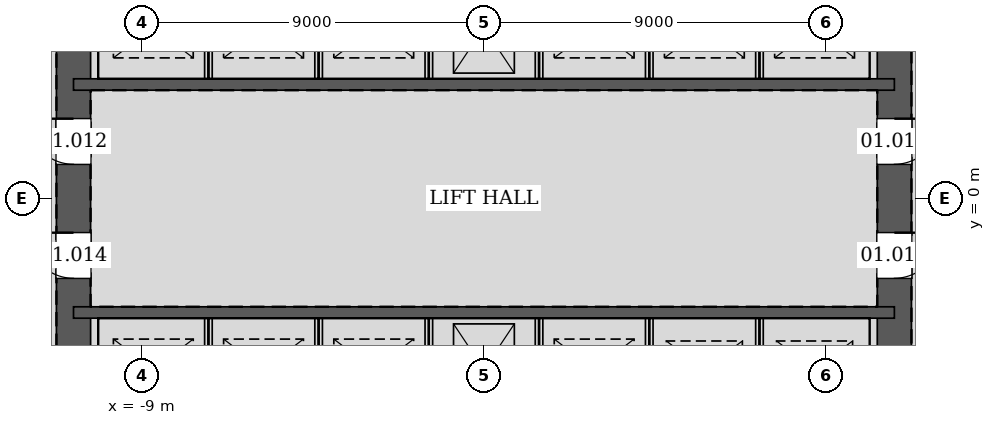
"""IFC4 building model, lengths in metres.
Left out: names, types, materials, properties, quantities, classifications, styles, units other than length and angle.
Written with IfcOpenShell. Run it as: python <this file> out.ifc"""

import sys

from ifc_helpers import new_model, si_unit, direction, frame, frame_2d, origin, place, context, subcontext, project, spatial, rectangle, extrude, element, fill, save


model = new_model("IFC4")
c1 = context("Model", 3, precision=1e-05, world=origin(), true_north=direction((0.0, 1.0)))
c2 = subcontext(c1, "Body", "Model", "MODEL_VIEW")
j1 = project(units=[si_unit("LENGTHUNIT", "METRE"), si_unit("PLANEANGLEUNIT", "RADIAN")], contexts=[c1])
p1 = place(None, origin())
s1 = spatial("IfcSite", under=j1, at=p1, CompositionType="ELEMENT")
p2 = place(p1, origin())
s2 = spatial("IfcBuilding", under=s1, at=p2, CompositionType="ELEMENT")
p3 = place(p2, frame((0.0, 0.0, 7.2)))
s3 = spatial("IfcBuildingStorey", under=s2, at=p3, CompositionType="ELEMENT", Elevation=7.2)
p4 = place(p3, frame((10.8, -10.8, 0.0), z_axis=(0.0, 0.0, 1.0), x_axis=(0.0, 1.0, 0.0)))
e1 = element("IfcWall", 1, at=p4, inside=s3, PredefinedType="SOLIDWALL", context=c2, shape_type="SweptSolid", body=[
    extrude(rectangle(XDim=21.6, YDim=0.9, at=frame_2d((10.8, 0.0))), origin(), (0.0, 0.0, 1.0), 6.0),
])
p5 = place(p4, frame((11.7, 0.0, 0.0)))
e2 = element("IfcOpeningElement", 2, at=p5, cuts=e1, PredefinedType="OPENING", context=c2, shape_type="SweptSolid", body=[
    extrude(rectangle(XDim=1.2, YDim=2.1, at=frame_2d((0.6, 1.05))), frame((0.0, 0.46, 0.0), z_axis=(0.0, -1.0, 0.0), x_axis=(1.0, 0.0, 0.0)), (0.0, 0.0, 1.0), 0.92),
])
p6 = place(p4, frame((8.7, 0.0, 0.0)))
e3 = element("IfcOpeningElement", 3, at=p6, cuts=e1, PredefinedType="OPENING", context=c2, shape_type="SweptSolid", body=[
    extrude(rectangle(XDim=1.2, YDim=2.1, at=frame_2d((0.6, 1.05))), frame((0.0, 0.46, 0.0), z_axis=(0.0, -1.0, 0.0), x_axis=(1.0, 0.0, 0.0)), (0.0, 0.0, 1.0), 0.92),
])
p7 = place(p3, frame((-10.8, 10.8, 0.0), z_axis=(0.0, 0.0, 1.0), x_axis=(0.0, -1.0, 0.0)))
e4 = element("IfcWall", 4, at=p7, inside=s3, PredefinedType="SOLIDWALL", context=c2, shape_type="SweptSolid", body=[
    extrude(rectangle(XDim=21.6, YDim=0.9, at=frame_2d((10.8, 0.0))), origin(), (0.0, 0.0, 1.0), 6.0),
])
p8 = place(p7, frame((8.7, 0.0, 0.0)))
e5 = element("IfcOpeningElement", 5, at=p8, cuts=e4, PredefinedType="OPENING", context=c2, shape_type="SweptSolid", body=[
    extrude(rectangle(XDim=1.2, YDim=2.1, at=frame_2d((0.6, 1.05))), frame((0.0, 0.46, 0.0), z_axis=(0.0, -1.0, 0.0), x_axis=(1.0, 0.0, 0.0)), (0.0, 0.0, 1.0), 0.92),
])
p9 = place(p7, frame((11.7, 0.0, 0.0)))
e6 = element("IfcOpeningElement", 6, at=p9, cuts=e4, PredefinedType="OPENING", context=c2, shape_type="SweptSolid", body=[
    extrude(rectangle(XDim=1.2, YDim=2.1, at=frame_2d((0.6, 1.05))), frame((0.0, 0.46, 0.0), z_axis=(0.0, -1.0, 0.0), x_axis=(1.0, 0.0, 0.0)), (0.0, 0.0, 1.0), 0.92),
])
for number, where, z_axis, x_axis in (
    (7, (-10.8, 3.0, 0.0), (0.0, 0.0, 1.0), (1.0, 0.0, 0.0)),
    (8, (-10.8, -3.0, 0.0), (0.0, 0.0, 1.0), (1.0, 0.0, 0.0)),
):
    element("IfcWall", number, at=place(p3, frame(where, z_axis=z_axis, x_axis=x_axis)), inside=s3, PredefinedType="SOLIDWALL", context=c2, shape_type="SweptSolid", body=[
        extrude(rectangle(XDim=21.6, YDim=0.3, at=frame_2d((10.8, 0.0))), origin(), (0.0, 0.0, 1.0), 6.0),
    ])
for number, where, z_axis, x_axis in (
    (9, (-7.25, 3.15, 0.0), (0.0, 0.0, 1.0), (0.0, 1.0, 0.0)),
    (10, (-4.35, 3.15, 0.0), (0.0, 0.0, 1.0), (0.0, 1.0, 0.0)),
    (11, (-1.45, 3.15, 0.0), (0.0, 0.0, 1.0), (0.0, 1.0, 0.0)),
    (12, (1.45, 3.15, 0.0), (0.0, 0.0, 1.0), (0.0, 1.0, 0.0)),
    (13, (4.35, 3.15, 0.0), (0.0, 0.0, 1.0), (0.0, 1.0, 0.0)),
    (14, (7.25, 3.15, 0.0), (0.0, 0.0, 1.0), (0.0, 1.0, 0.0)),
    (15, (-7.25, -5.85, 0.0), (0.0, 0.0, 1.0), (0.0, 1.0, 0.0)),
    (16, (-4.35, -5.85, 0.0), (0.0, 0.0, 1.0), (0.0, 1.0, 0.0)),
    (17, (-1.45, -5.85, 0.0), (0.0, 0.0, 1.0), (0.0, 1.0, 0.0)),
    (18, (1.45, -5.85, 0.0), (0.0, 0.0, 1.0), (0.0, 1.0, 0.0)),
    (19, (4.35, -5.85, 0.0), (0.0, 0.0, 1.0), (0.0, 1.0, 0.0)),
    (20, (7.25, -5.85, 0.0), (0.0, 0.0, 1.0), (0.0, 1.0, 0.0)),
):
    element("IfcWall", number, at=place(p3, frame(where, z_axis=z_axis, x_axis=x_axis)), inside=s3, PredefinedType="PARTITIONING", context=c2, shape_type="SweptSolid", body=[
        extrude(rectangle(XDim=2.7, YDim=0.2, at=frame_2d((1.35, 0.0))), origin(), (0.0, 0.0, 1.0), 6.0),
    ])
p10 = place(p5, frame((1.2, 0.0, 0.0), z_axis=(0.0, 0.0, 1.0), x_axis=(-1.0, 0.0, 0.0)))
e21 = element("IfcDoor", 21, at=p10, inside=s3, OperationType="SINGLE_SWING_LEFT", PredefinedType="DOOR", context=c2, shape_type="SweptSolid", body=[
    extrude(rectangle(XDim=1.2, YDim=2.1, at=frame_2d((0.6, 1.05))), frame((0.0, 0.025, 0.0), z_axis=(0.0, -1.0, 0.0), x_axis=(1.0, 0.0, 0.0)), (0.0, 0.0, 1.0), 0.05),
])
fill(e2, e21)
p11 = place(p8, frame((1.2, 0.0, 0.0), z_axis=(0.0, 0.0, 1.0), x_axis=(-1.0, 0.0, 0.0)))
e22 = element("IfcDoor", 22, at=p11, inside=s3, OperationType="SINGLE_SWING_RIGHT", PredefinedType="DOOR", context=c2, shape_type="SweptSolid", body=[
    extrude(rectangle(XDim=1.2, YDim=2.1, at=frame_2d((0.6, 1.05))), frame((0.0, 0.025, 0.0), z_axis=(0.0, -1.0, 0.0), x_axis=(1.0, 0.0, 0.0)), (0.0, 0.0, 1.0), 0.05),
])
fill(e5, e22)
p12 = place(p6, frame((1.2, 0.0, 0.0), z_axis=(0.0, 0.0, 1.0), x_axis=(-1.0, 0.0, 0.0)))
e23 = element("IfcDoor", 23, at=p12, inside=s3, OperationType="SINGLE_SWING_LEFT", PredefinedType="DOOR", context=c2, shape_type="SweptSolid", body=[
    extrude(rectangle(XDim=1.2, YDim=2.1, at=frame_2d((0.6, 1.05))), frame((0.0, 0.025, 0.0), z_axis=(0.0, -1.0, 0.0), x_axis=(1.0, 0.0, 0.0)), (0.0, 0.0, 1.0), 0.05),
])
fill(e3, e23)
p13 = place(p9, frame((1.2, 0.0, 0.0), z_axis=(0.0, 0.0, 1.0), x_axis=(-1.0, 0.0, 0.0)))
e24 = element("IfcDoor", 24, at=p13, inside=s3, OperationType="SINGLE_SWING_RIGHT", PredefinedType="DOOR", context=c2, shape_type="SweptSolid", body=[
    extrude(rectangle(XDim=1.2, YDim=2.1, at=frame_2d((0.6, 1.05))), frame((0.0, 0.025, 0.0), z_axis=(0.0, -1.0, 0.0), x_axis=(1.0, 0.0, 0.0)), (0.0, 0.0, 1.0), 0.05),
])
fill(e6, e24)
save(model, sys.argv[1])
